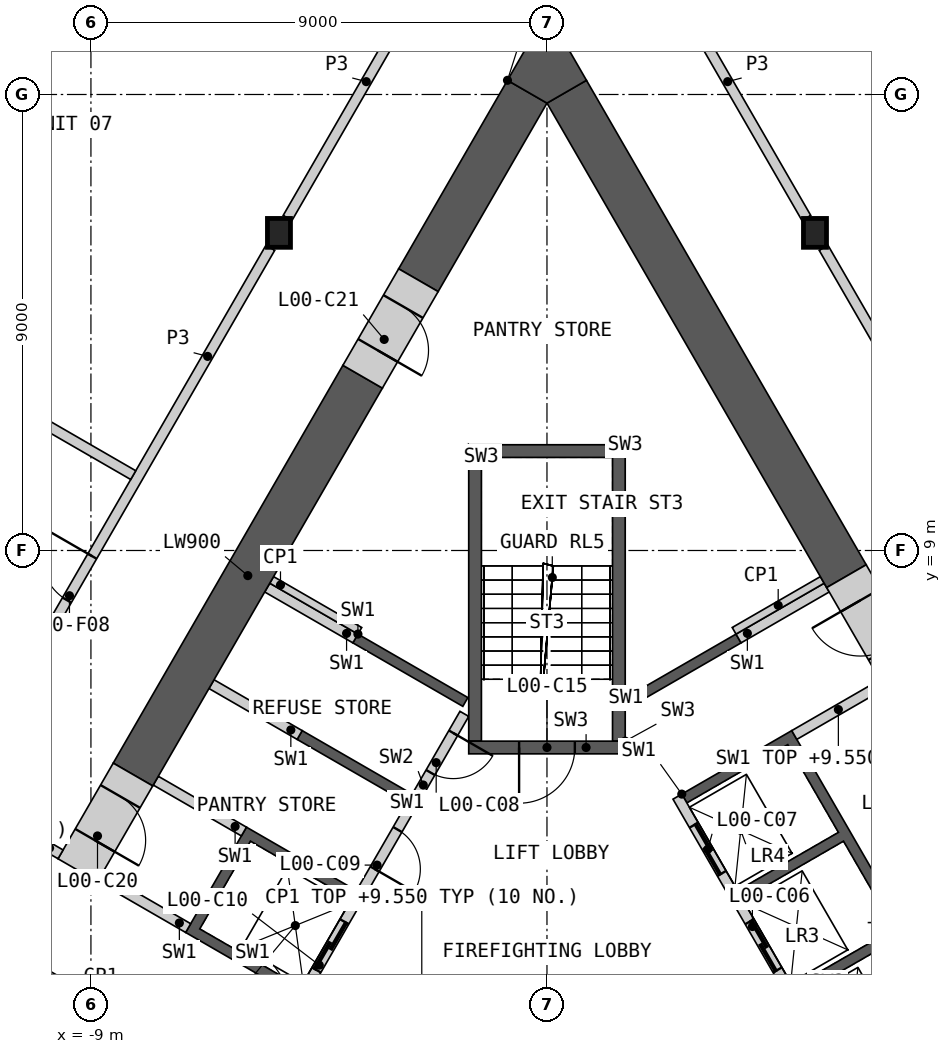
"""IFC4 building model, lengths in metres.
Left out: names, types, materials, properties, quantities, classifications, styles, units other than length and angle.
Written with IfcOpenShell. Run it as: python <this file> out.ifc"""

import sys

from ifc_helpers import new_model, si_unit, direction, frame, frame_2d, origin, origin_2d, place, context, subcontext, project, spatial, polyline, rectangle, i_section, outline, extrude, element, fill, save


model = new_model("IFC4")
c1 = context("Model", 3, precision=1e-05, world=origin(), true_north=direction((0.0, 1.0)))
c2 = subcontext(c1, "Body", "Model", "MODEL_VIEW")
j1 = project(units=[si_unit("LENGTHUNIT", "METRE"), si_unit("PLANEANGLEUNIT", "RADIAN")], contexts=[c1])
p1 = place(None, origin())
s1 = spatial("IfcSite", under=j1, at=p1, CompositionType="ELEMENT")
p2 = place(p1, origin())
s2 = spatial("IfcBuilding", under=s1, at=p2, CompositionType="ELEMENT")
p3 = place(p2, origin())
s3 = spatial("IfcBuildingStorey", under=s2, at=p3, CompositionType="ELEMENT", Elevation=0.0)
for number, where, z_axis, x_axis in (
    (1, (-5.289, 15.269, 0.0), (0.0, 0.0, 1.0), (1.0, 0.0, 0.0)),
    (2, (5.289, 15.269, 0.0), (0.0, 0.0, 1.0), (1.0, 0.0, 0.0)),
):
    element("IfcColumn", number, at=place(p3, frame(where, z_axis=z_axis, x_axis=x_axis)), inside=s3, PredefinedType="COLUMN", context=c2, shape_type="SweptSolid", body=[
        extrude(i_section(OverallWidth=0.454, OverallDepth=0.57, WebThickness=0.078, FlangeThickness=0.125, at=origin_2d()), origin(), (0.0, 0.0, 1.0), 10.0),
    ])
p4 = place(p3, origin())
e3 = element("IfcWall", 3, at=p4, inside=s3, PredefinedType="SHEAR", context=c2, shape_type="SweptSolid", body=[
    extrude(outline(polyline([(1.561, 6.097), (3.731, 7.35), (3.831, 7.177), (1.66, 5.924), (1.561, 6.097)])), origin(), (0.0, 0.0, 1.0), 9.55),
])
p5 = place(p3, origin())
e4 = element("IfcWall", 4, at=p5, inside=s3, PredefinedType="SHEAR", context=c2, shape_type="SweptSolid", body=[
    extrude(outline(polyline([(2.66, 4.192), (4.831, 5.445), (8.231, -0.444), (6.061, -1.697), (5.96, -1.524), (7.952, -0.374), (6.952, 1.358), (4.96, 0.208), (4.861, 0.381), (6.852, 1.531), (5.852, 3.263), (3.861, 2.113), (3.76, 2.287), (5.752, 3.437), (4.752, 5.169), (2.76, 4.019), (2.66, 4.192)])), origin(), (0.0, 0.0, 1.0), 9.55),
])
p6 = place(p3, frame((5.817, -1.476, 0.0), z_axis=(0.0, 0.0, 1.0), x_axis=(-0.499992876559, 0.866029516466, 0.0)))
e5 = element("IfcWall", 5, at=p6, inside=s3, PredefinedType="SOLIDWALL", context=c2, shape_type="SweptSolid", body=[
    extrude(rectangle(XDim=6.486, YDim=0.2, at=frame_2d((3.243, 0.0))), origin(), (0.0, 0.0, 1.0), 9.55),
])
p7 = place(p6, frame((0.337, 0.0, 0.0)))
e6 = element("IfcOpeningElement", 6, at=p7, cuts=e5, PredefinedType="OPENING", context=c2, shape_type="SweptSolid", body=[
    extrude(rectangle(XDim=1.1, YDim=2.1, at=frame_2d((0.55, 1.05))), frame((0.0, 0.11, 0.0), z_axis=(0.0, -1.0, 0.0), x_axis=(1.0, 0.0, 0.0)), (0.0, 0.0, 1.0), 0.22),
])
p8 = place(p6, frame((2.537, 0.0, 0.0)))
e7 = element("IfcOpeningElement", 7, at=p8, cuts=e5, PredefinedType="OPENING", context=c2, shape_type="SweptSolid", body=[
    extrude(rectangle(XDim=1.1, YDim=2.1, at=frame_2d((0.55, 1.05))), frame((0.0, 0.11, 0.0), z_axis=(0.0, -1.0, 0.0), x_axis=(1.0, 0.0, 0.0)), (0.0, 0.0, 1.0), 0.22),
])
p9 = place(p6, frame((4.737, 0.0, 0.0)))
e8 = element("IfcOpeningElement", 8, at=p9, cuts=e5, PredefinedType="OPENING", context=c2, shape_type="SweptSolid", body=[
    extrude(rectangle(XDim=1.1, YDim=2.1, at=frame_2d((0.55, 1.05))), frame((0.0, 0.11, 0.0), z_axis=(0.0, -1.0, 0.0), x_axis=(1.0, 0.0, 0.0)), (0.0, 0.0, 1.0), 0.22),
])
p10 = place(p3, frame((4.881, 5.358, 0.0), z_axis=(0.0, 0.0, 1.0), x_axis=(0.866035824272, 0.499981950752, 0.0)))
e9 = element("IfcWall", 9, at=p10, inside=s3, PredefinedType="SHEAR", context=c2, shape_type="SweptSolid", body=[
    extrude(rectangle(XDim=2.009, YDim=0.2, at=frame_2d((1.004, 0.0))), origin(), (0.0, 0.0, 1.0), 9.55),
])
p11 = place(p3, frame((3.781, 7.263, 0.0), z_axis=(0.0, 0.0, 1.0), x_axis=(0.865983199114, 0.50007309351, 0.0)))
e10 = element("IfcWall", 10, at=p11, inside=s3, PredefinedType="SHEAR", context=c2, shape_type="SweptSolid", body=[
    extrude(rectangle(XDim=2.009, YDim=0.2, at=frame_2d((1.004, 0.0))), origin(), (0.0, 0.0, 1.0), 9.55),
])
p12 = place(p3, origin())
e11 = element("IfcWall", 11, at=p12, inside=s3, PredefinedType="SHEAR", context=c2, shape_type="SweptSolid", body=[
    extrude(outline(polyline([(-4.96, 0.208), (-7.131, 1.461), (-5.931, 3.54), (-3.76, 2.287), (-3.861, 2.113), (-5.852, 3.263), (-6.852, 1.531), (-4.861, 0.381), (-4.96, 0.208)])), origin(), (0.0, 0.0, 1.0), 9.55),
])
p13 = place(p3, origin())
e12 = element("IfcWall", 12, at=p13, inside=s3, PredefinedType="SHEAR", context=c2, shape_type="SweptSolid", body=[
    extrude(outline(polyline([(-2.76, 4.019), (-4.931, 5.272), (-4.831, 5.445), (-2.66, 4.192), (-2.76, 4.019)])), origin(), (0.0, 0.0, 1.0), 9.55),
])
p14 = place(p3, origin())
e13 = element("IfcWall", 13, at=p14, inside=s3, PredefinedType="SHEAR", context=c2, shape_type="SweptSolid", body=[
    extrude(outline(polyline([(-3.731, 7.35), (-1.561, 6.097), (-1.66, 5.924), (-3.831, 7.177), (-3.731, 7.35)])), origin(), (0.0, 0.0, 1.0), 9.55),
])
p15 = place(p3, frame((-1.631, 5.776, 0.0), z_axis=(0.0, 0.0, 1.0), x_axis=(-0.499992876559, -0.866029516466, 0.0)))
e14 = element("IfcWall", 14, at=p15, inside=s3, PredefinedType="SOLIDWALL", context=c2, shape_type="SweptSolid", body=[
    extrude(rectangle(XDim=6.486, YDim=0.2, at=frame_2d((3.243, 0.0))), origin(), (0.0, 0.0, 1.0), 9.55),
])
p16 = place(p15, frame((0.437, 0.0, 0.0)))
e15 = element("IfcOpeningElement", 15, at=p16, cuts=e14, PredefinedType="OPENING", context=c2, shape_type="SweptSolid", body=[
    extrude(rectangle(XDim=0.9, YDim=2.1, at=frame_2d((0.45, 1.05))), frame((0.0, 0.11, 0.0), z_axis=(0.0, -1.0, 0.0), x_axis=(1.0, 0.0, 0.0)), (0.0, 0.0, 1.0), 0.22),
])
p17 = place(p15, frame((2.637, 0.0, 0.0)))
e16 = element("IfcOpeningElement", 16, at=p17, cuts=e14, PredefinedType="OPENING", context=c2, shape_type="SweptSolid", body=[
    extrude(rectangle(XDim=0.9, YDim=2.1, at=frame_2d((0.45, 1.05))), frame((0.0, 0.11, 0.0), z_axis=(0.0, -1.0, 0.0), x_axis=(1.0, 0.0, 0.0)), (0.0, 0.0, 1.0), 0.22),
])
p18 = place(p15, frame((4.737, 0.0, 0.0)))
e17 = element("IfcOpeningElement", 17, at=p18, cuts=e14, PredefinedType="OPENING", context=c2, shape_type="SweptSolid", body=[
    extrude(rectangle(XDim=1.1, YDim=2.1, at=frame_2d((0.55, 1.05))), frame((0.0, 0.11, 0.0), z_axis=(0.0, -1.0, 0.0), x_axis=(1.0, 0.0, 0.0)), (0.0, 0.0, 1.0), 0.22),
])
p19 = place(p3, frame((-3.781, 7.263, 0.0), z_axis=(0.0, 0.0, 1.0), x_axis=(-0.865983199114, 0.50007309351, 0.0)))
e18 = element("IfcWall", 18, at=p19, inside=s3, PredefinedType="SHEAR", context=c2, shape_type="SweptSolid", body=[
    extrude(rectangle(XDim=2.009, YDim=0.2, at=frame_2d((1.004, 0.0))), origin(), (0.0, 0.0, 1.0), 9.55),
])
p20 = place(p3, frame((-4.881, 5.358, 0.0), z_axis=(0.0, 0.0, 1.0), x_axis=(-0.866035824272, 0.499981950752, 0.0)))
e19 = element("IfcWall", 19, at=p20, inside=s3, PredefinedType="SHEAR", context=c2, shape_type="SweptSolid", body=[
    extrude(rectangle(XDim=2.009, YDim=0.2, at=frame_2d((1.004, 0.0))), origin(), (0.0, 0.0, 1.0), 9.55),
])
p21 = place(p3, frame((-5.981, 3.453, 0.0), z_axis=(0.0, 0.0, 1.0), x_axis=(-0.866013584312, 0.500020471368, 0.0)))
e20 = element("IfcWall", 20, at=p21, inside=s3, PredefinedType="SHEAR", context=c2, shape_type="SweptSolid", body=[
    extrude(rectangle(XDim=2.009, YDim=0.2, at=frame_2d((1.005, 0.0))), origin(), (0.0, 0.0, 1.0), 9.55),
])
p22 = place(p3, frame((-7.081, 1.548, 0.0), z_axis=(0.0, 0.0, 1.0), x_axis=(-0.865983199114, 0.50007309351, 0.0)))
e21 = element("IfcWall", 21, at=p22, inside=s3, PredefinedType="SHEAR", context=c2, shape_type="SweptSolid", body=[
    extrude(rectangle(XDim=2.009, YDim=0.2, at=frame_2d((1.004, 0.0))), origin(), (0.0, 0.0, 1.0), 9.55),
])
p23 = place(p3, frame((-8.181, -0.357, 0.0), z_axis=(0.0, 0.0, 1.0), x_axis=(-0.866035824272, 0.499981950752, 0.0)))
e22 = element("IfcWall", 22, at=p23, inside=s3, PredefinedType="SHEAR", context=c2, shape_type="SweptSolid", body=[
    extrude(rectangle(XDim=2.009, YDim=0.2, at=frame_2d((1.004, 0.0))), origin(), (0.0, 0.0, 1.0), 9.55),
])
p24 = place(p3, origin())
e23 = element("IfcWall", 23, at=p24, inside=s3, PredefinedType="SHEAR", context=c2, shape_type="SweptSolid", body=[
    extrude(outline(polyline([(1.544, 5.237), (1.544, 11.087), (1.294, 10.837), (1.294, 5.237), (1.544, 5.237)])), origin(), (0.0, 0.0, 1.0), 9.55),
])
p25 = place(p3, origin())
e24 = element("IfcWall", 24, at=p25, inside=s3, PredefinedType="SHEAR", context=c2, shape_type="SweptSolid", body=[
    extrude(outline(polyline([(1.544, 11.087), (-1.544, 11.087), (-1.294, 10.837), (1.294, 10.837), (1.544, 11.087)])), origin(), (0.0, 0.0, 1.0), 9.55),
])
p26 = place(p3, origin())
e25 = element("IfcWall", 25, at=p26, inside=s3, PredefinedType="SHEAR", context=c2, shape_type="SweptSolid", body=[
    extrude(outline(polyline([(-1.294, 10.837), (-1.544, 11.087), (-1.544, 5.237), (-1.294, 5.237), (-1.294, 10.837)])), origin(), (0.0, 0.0, 1.0), 9.55),
])
p27 = place(p3, frame((1.544, 5.112, 0.0), z_axis=(0.0, 0.0, 1.0), x_axis=(-1.0, 0.0, 0.0)))
e26 = element("IfcWall", 26, at=p27, inside=s3, PredefinedType="SHEAR", context=c2, shape_type="SweptSolid", body=[
    extrude(rectangle(XDim=3.088, YDim=0.25, at=frame_2d((1.544, 0.0))), origin(), (0.0, 0.0, 1.0), 9.55),
])
p28 = place(p27, frame((0.994, 0.0, 0.0)))
e27 = element("IfcOpeningElement", 27, at=p28, cuts=e26, PredefinedType="OPENING", context=c2, shape_type="SweptSolid", body=[
    extrude(rectangle(XDim=1.1, YDim=2.1, at=frame_2d((0.55, 1.05))), frame((0.0, 0.135, 0.0), z_axis=(0.0, -1.0, 0.0), x_axis=(1.0, 0.0, 0.0)), (0.0, 0.0, 1.0), 0.27),
])
for number, where, z_axis, x_axis in (
    (28, (3.693, 7.415, 0.0), (0.0, 0.0, 1.0), (0.866, 0.5, 0.0)),
    (29, (-3.693, 7.415, 0.0), (0.0, 0.0, 1.0), (-0.866, 0.5, 0.0)),
):
    element("IfcWall", number, at=place(p3, frame(where, z_axis=z_axis, x_axis=x_axis)), inside=s3, PredefinedType="PARTITIONING", context=c2, shape_type="SweptSolid", body=[
        extrude(rectangle(XDim=2.009, YDim=0.15, at=frame_2d((1.004, 0.0))), origin(), (0.0, 0.0, 1.0), 9.55),
    ])
p29 = place(p3, frame((5.91, 8.493, 0.0), z_axis=(0.0, 0.0, 1.0), x_axis=(-0.50000828114, 0.866020622613, 0.0)))
e30 = element("IfcWall", 30, at=p29, inside=s3, PredefinedType="SHEAR", context=c2, shape_type="SweptSolid", body=[
    extrude(rectangle(XDim=11.041, YDim=0.9, at=frame_2d((5.521, 0.0))), origin(), (0.0, 0.0, 1.0), 9.55),
])
p30 = place(p3, frame((-3.637, 12.43, 0.0), z_axis=(0.0, 0.0, 1.0), x_axis=(-0.500011513458, -0.866018756384, 0.0)))
e31 = element("IfcWall", 31, at=p30, inside=s3, PredefinedType="SHEAR", context=c2, shape_type="SweptSolid", body=[
    extrude(rectangle(XDim=9.066, YDim=0.9, at=frame_2d((4.533, 0.0))), origin(), (0.0, 0.0, 1.0), 9.55),
])
p31 = place(p3, frame((-0.39, 18.055, 0.0), z_axis=(0.0, 0.0, 1.0), x_axis=(-0.500014347272, -0.866017120224, 0.0)))
e32 = element("IfcWall", 32, at=p31, inside=s3, PredefinedType="SHEAR", context=c2, shape_type="SweptSolid", body=[
    extrude(rectangle(XDim=4.296, YDim=0.9, at=frame_2d((2.148, 0.0))), origin(), (0.0, 0.0, 1.0), 9.55),
])
p32 = place(p3, origin())
e33 = element("IfcWall", 33, at=p32, inside=s3, PredefinedType="SHEAR", context=c2, shape_type="SweptSolid", body=[
    extrude(outline(polyline([(-0.779, 18.28), (0.0, 19.63), (0.779, 18.28), (0.0, 17.83), (-0.779, 18.28)])), origin(), (0.0, 0.0, 1.0), 9.55),
])
p33 = place(p3, frame((-8.17, 4.579, 0.0), z_axis=(0.0, 0.0, 1.0), x_axis=(-0.499945432413, -0.866056906104, 0.0)))
e34 = element("IfcWall", 34, at=p33, inside=s3, PredefinedType="SHEAR", context=c2, shape_type="SweptSolid", body=[
    extrude(rectangle(XDim=2.18, YDim=0.9, at=frame_2d((1.09, 0.0))), origin(), (0.0, 0.0, 1.0), 9.55),
])
p34 = place(p33, frame((0.5, 0.0, 0.0)))
e35 = element("IfcOpeningElement", 35, at=p34, cuts=e34, PredefinedType="OPENING", context=c2, shape_type="SweptSolid", body=[
    extrude(rectangle(XDim=1.0, YDim=2.1, at=frame_2d((0.5, 1.05))), frame((0.0, 0.46, 0.0), z_axis=(0.0, -1.0, 0.0), x_axis=(1.0, 0.0, 0.0)), (0.0, 0.0, 1.0), 0.92),
])
p35 = place(p3, frame((-2.538, 14.335, 0.0), z_axis=(0.0, 0.0, 1.0), x_axis=(-0.499994660107, -0.866028486751, 0.0)))
e36 = element("IfcWall", 36, at=p35, inside=s3, PredefinedType="SHEAR", context=c2, shape_type="SweptSolid", body=[
    extrude(rectangle(XDim=2.2, YDim=0.9, at=frame_2d((1.1, 0.0))), origin(), (0.0, 0.0, 1.0), 9.55),
])
p36 = place(p35, frame((0.6, 0.0, 0.0)))
e37 = element("IfcOpeningElement", 37, at=p36, cuts=e36, PredefinedType="OPENING", context=c2, shape_type="SweptSolid", body=[
    extrude(rectangle(XDim=1.0, YDim=2.1, at=frame_2d((0.5, 1.05))), frame((0.0, 0.46, 0.0), z_axis=(0.0, -1.0, 0.0), x_axis=(1.0, 0.0, 0.0)), (0.0, 0.0, 1.0), 0.92),
])
p37 = place(p3, frame((7.01, 6.588, 0.0), z_axis=(0.0, 0.0, 1.0), x_axis=(-0.499946605688, 0.86605622881, 0.0)))
e38 = element("IfcWall", 38, at=p37, inside=s3, PredefinedType="SHEAR", context=c2, shape_type="SweptSolid", body=[
    extrude(rectangle(XDim=2.2, YDim=0.9, at=frame_2d((1.1, 0.0))), origin(), (0.0, 0.0, 1.0), 9.55),
])
p38 = place(p37, frame((0.55, 0.0, 0.0)))
e39 = element("IfcOpeningElement", 39, at=p38, cuts=e38, PredefinedType="OPENING", context=c2, shape_type="SweptSolid", body=[
    extrude(rectangle(XDim=1.1, YDim=2.1, at=frame_2d((0.55, 1.05))), frame((0.0, 0.46, 0.0), z_axis=(0.0, -1.0, 0.0), x_axis=(1.0, 0.0, 0.0)), (0.0, 0.0, 1.0), 0.92),
])
p39 = place(p3, frame((5.459, 14.974, 0.0), z_axis=(0.0, 0.0, 1.0), x_axis=(0.499985793049, -0.866033606016, 0.0)))
e40 = element("IfcWall", 40, at=p39, inside=s3, PredefinedType="PARTITIONING", context=c2, shape_type="SweptSolid", body=[
    extrude(rectangle(XDim=9.898, YDim=0.2, at=frame_2d((4.949, 0.0))), origin(), (0.0, 0.0, 1.0), 9.55),
])
p40 = place(p39, frame((3.898, 0.0, 0.0)))
e41 = element("IfcOpeningElement", 41, at=p40, cuts=e40, PredefinedType="OPENING", context=c2, shape_type="SweptSolid", body=[
    extrude(rectangle(XDim=2.0, YDim=2.1, at=frame_2d((1.0, 1.05))), frame((0.0, 0.11, 0.0), z_axis=(0.0, -1.0, 0.0), x_axis=(1.0, 0.0, 0.0)), (0.0, 0.0, 1.0), 0.22),
])
p41 = place(p3, frame((-10.408, 6.402, 0.0), z_axis=(0.0, 0.0, 1.0), x_axis=(0.499985793049, 0.866033606016, 0.0)))
e42 = element("IfcWall", 42, at=p41, inside=s3, PredefinedType="PARTITIONING", context=c2, shape_type="SweptSolid", body=[
    extrude(rectangle(XDim=9.898, YDim=0.2, at=frame_2d((4.949, 0.0))), origin(), (0.0, 0.0, 1.0), 9.55),
])
p42 = place(p41, frame((1.869, 0.0, 0.0)))
e43 = element("IfcOpeningElement", 43, at=p42, cuts=e42, PredefinedType="OPENING", context=c2, shape_type="SweptSolid", body=[
    extrude(rectangle(XDim=1.0, YDim=2.1, at=frame_2d((0.5, 1.05))), frame((0.0, 0.11, 0.0), z_axis=(0.0, -1.0, 0.0), x_axis=(1.0, 0.0, 0.0)), (0.0, 0.0, 1.0), 0.22),
])
for number, where, z_axis, x_axis in (
    (44, (-5.119, 15.563, 0.0), (0.0, 0.0, 1.0), (0.5, 0.866, 0.0)),
    (45, (2.013, 20.943, 0.0), (0.0, 0.0, 1.0), (0.5, -0.866, 0.0)),
):
    element("IfcWall", number, at=place(p3, frame(where, z_axis=z_axis, x_axis=x_axis)), inside=s3, PredefinedType="PARTITIONING", context=c2, shape_type="SweptSolid", body=[
        extrude(rectangle(XDim=6.212, YDim=0.2, at=frame_2d((3.106, 0.0))), origin(), (0.0, 0.0, 1.0), 9.55),
    ])
p43 = place(p3, frame((-15.392, 14.66, 0.0), z_axis=(0.0, 0.0, 1.0), x_axis=(0.866027244746, -0.499996811348, 0.0)))
e46 = element("IfcWall", 46, at=p43, inside=s3, PredefinedType="PARTITIONING", context=c2, shape_type="SweptSolid", body=[
    extrude(rectangle(XDim=8.345, YDim=0.2, at=frame_2d((4.172, 0.0))), origin(), (0.0, 0.0, 1.0), 9.55),
])
p44 = place(p3, frame((-11.764, 4.253, 0.0), z_axis=(0.0, 0.0, 1.0), x_axis=(0.86600986831, -0.500026907266, 0.0)))
e47 = element("IfcWall", 47, at=p44, inside=s3, PredefinedType="PARTITIONING", context=c2, shape_type="SweptSolid", body=[
    extrude(rectangle(XDim=2.499, YDim=0.2, at=frame_2d((1.25, 0.0))), origin(), (0.0, 0.0, 1.0), 9.55),
])
p45 = place(p8, origin())
e48 = element("IfcDoor", 48, at=p45, inside=s3, OperationType="SLIDING_TO_LEFT", PredefinedType="DOOR", context=c2, shape_type="SweptSolid", body=[
    extrude(rectangle(XDim=1.1, YDim=2.1, at=frame_2d((0.55, 1.05))), frame((0.0, 0.025, 0.0), z_axis=(0.0, -1.0, 0.0), x_axis=(1.0, 0.0, 0.0)), (0.0, 0.0, 1.0), 0.05),
])
fill(e7, e48)
p46 = place(p9, origin())
e49 = element("IfcDoor", 49, at=p46, inside=s3, OperationType="SLIDING_TO_LEFT", PredefinedType="DOOR", context=c2, shape_type="SweptSolid", body=[
    extrude(rectangle(XDim=1.1, YDim=2.1, at=frame_2d((0.55, 1.05))), frame((0.0, 0.025, 0.0), z_axis=(0.0, -1.0, 0.0), x_axis=(1.0, 0.0, 0.0)), (0.0, 0.0, 1.0), 0.05),
])
fill(e8, e49)
p47 = place(p16, origin())
e50 = element("IfcDoor", 50, at=p47, inside=s3, OperationType="SINGLE_SWING_LEFT", PredefinedType="DOOR", context=c2, shape_type="SweptSolid", body=[
    extrude(rectangle(XDim=0.9, YDim=2.1, at=frame_2d((0.45, 1.05))), frame((0.0, 0.025, 0.0), z_axis=(0.0, -1.0, 0.0), x_axis=(1.0, 0.0, 0.0)), (0.0, 0.0, 1.0), 0.05),
])
fill(e15, e50)
p48 = place(p17, origin())
e51 = element("IfcDoor", 51, at=p48, inside=s3, OperationType="SINGLE_SWING_RIGHT", PredefinedType="DOOR", context=c2, shape_type="SweptSolid", body=[
    extrude(rectangle(XDim=0.9, YDim=2.1, at=frame_2d((0.45, 1.05))), frame((0.0, 0.025, 0.0), z_axis=(0.0, -1.0, 0.0), x_axis=(1.0, 0.0, 0.0)), (0.0, 0.0, 1.0), 0.05),
])
fill(e16, e51)
p49 = place(p18, origin())
e52 = element("IfcDoor", 52, at=p49, inside=s3, OperationType="SLIDING_TO_LEFT", PredefinedType="DOOR", context=c2, shape_type="SweptSolid", body=[
    extrude(rectangle(XDim=1.1, YDim=2.1, at=frame_2d((0.55, 1.05))), frame((0.0, 0.025, 0.0), z_axis=(0.0, -1.0, 0.0), x_axis=(1.0, 0.0, 0.0)), (0.0, 0.0, 1.0), 0.05),
])
fill(e17, e52)
p50 = place(p28, origin())
e53 = element("IfcDoor", 53, at=p50, inside=s3, OperationType="SINGLE_SWING_RIGHT", PredefinedType="DOOR", context=c2, shape_type="SweptSolid", body=[
    extrude(rectangle(XDim=1.1, YDim=2.1, at=frame_2d((0.55, 1.05))), frame((0.0, 0.025, 0.0), z_axis=(0.0, -1.0, 0.0), x_axis=(1.0, 0.0, 0.0)), (0.0, 0.0, 1.0), 0.05),
])
fill(e27, e53)
p51 = place(p34, origin())
e54 = element("IfcDoor", 54, at=p51, inside=s3, OperationType="SINGLE_SWING_RIGHT", PredefinedType="DOOR", context=c2, shape_type="SweptSolid", body=[
    extrude(rectangle(XDim=1.0, YDim=2.1, at=frame_2d((0.5, 1.05))), frame((0.0, 0.205, 0.0), z_axis=(0.0, -1.0, 0.0), x_axis=(1.0, 0.0, 0.0)), (0.0, 0.0, 1.0), 0.05),
])
fill(e35, e54)
p52 = place(p36, origin())
e55 = element("IfcDoor", 55, at=p52, inside=s3, OperationType="SINGLE_SWING_RIGHT", PredefinedType="DOOR", context=c2, shape_type="SweptSolid", body=[
    extrude(rectangle(XDim=1.0, YDim=2.1, at=frame_2d((0.5, 1.05))), frame((0.0, 0.205, 0.0), z_axis=(0.0, -1.0, 0.0), x_axis=(1.0, 0.0, 0.0)), (0.0, 0.0, 1.0), 0.05),
])
fill(e37, e55)
p53 = place(p38, origin())
e56 = element("IfcDoor", 56, at=p53, inside=s3, OperationType="SINGLE_SWING_RIGHT", PredefinedType="DOOR", context=c2, shape_type="SweptSolid", body=[
    extrude(rectangle(XDim=1.1, YDim=2.1, at=frame_2d((0.55, 1.05))), frame((0.0, 0.205, 0.0), z_axis=(0.0, -1.0, 0.0), x_axis=(1.0, 0.0, 0.0)), (0.0, 0.0, 1.0), 0.05),
])
fill(e39, e56)
p54 = place(p42, origin())
e57 = element("IfcDoor", 57, at=p54, inside=s3, OperationType="SINGLE_SWING_RIGHT", PredefinedType="DOOR", context=c2, shape_type="SweptSolid", body=[
    extrude(rectangle(XDim=1.0, YDim=2.1, at=frame_2d((0.5, 1.05))), frame((0.0, 0.025, 0.0), z_axis=(0.0, -1.0, 0.0), x_axis=(1.0, 0.0, 0.0)), (0.0, 0.0, 1.0), 0.05),
])
fill(e43, e57)
save(model, sys.argv[1])
